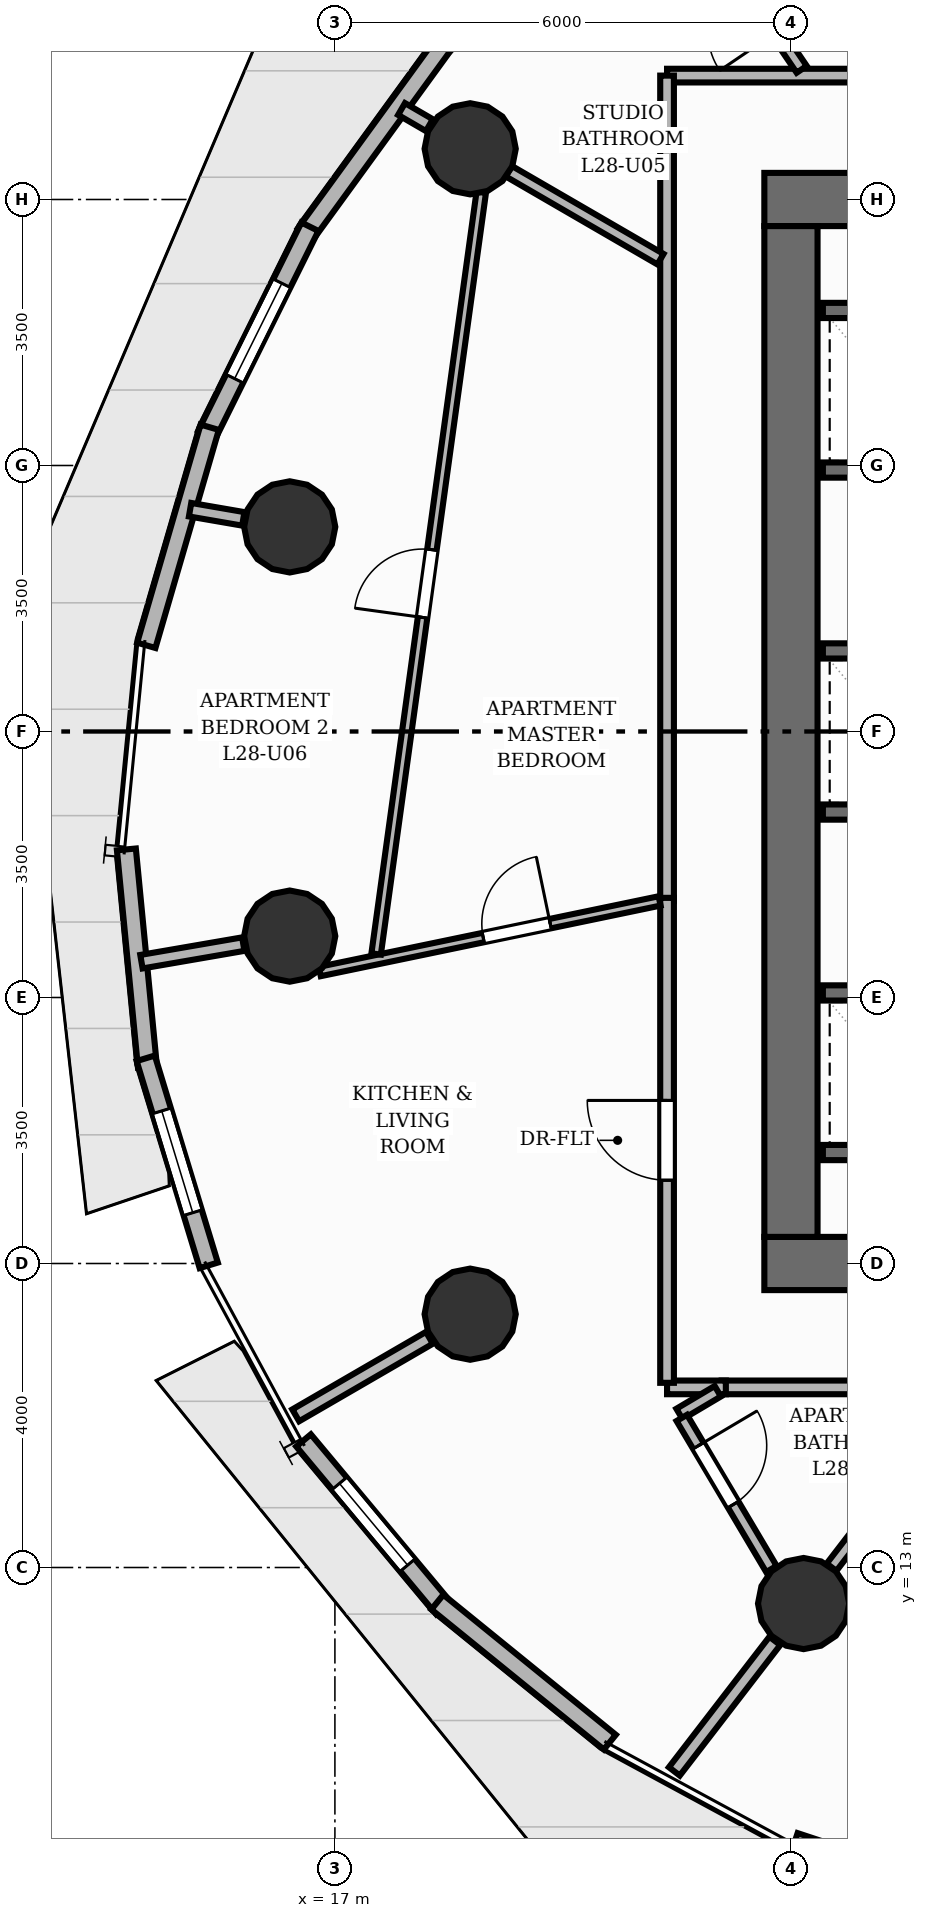
"""IFC4 building model, lengths in metres.
Left out: names, types, materials, properties, quantities, classifications, styles, units other than length and angle.
Written with IfcOpenShell. Run it as: python <this file> out.ifc"""

import sys

from ifc_helpers import new_model, si_unit, direction, frame, frame_2d, origin, origin_2d, place, context, subcontext, project, spatial, rectangle, circle, extrude, element, fill, save


model = new_model("IFC4")
c1 = context("Model", 3, precision=1e-05, world=origin(), true_north=direction((0.0, 1.0)))
c2 = subcontext(c1, "Body", "Model", "MODEL_VIEW")
j1 = project(units=[si_unit("LENGTHUNIT", "METRE"), si_unit("PLANEANGLEUNIT", "RADIAN")], contexts=[c1])
p1 = place(None, origin())
s1 = spatial("IfcSite", under=j1, at=p1, CompositionType="ELEMENT")
p2 = place(p1, origin())
s2 = spatial("IfcBuilding", under=s1, at=p2, CompositionType="ELEMENT")
p3 = place(p2, frame((0.0, 0.0, 96.48)))
s3 = spatial("IfcBuildingStorey", under=s2, at=p3, CompositionType="ELEMENT", Elevation=96.48)
p4 = place(p3, frame((22.65, 17.0, 0.0), z_axis=(0.0, 0.0, 1.0), x_axis=(1.0, 0.0, 0.0)))
e1 = element("IfcWall", 1, at=p4, inside=s3, PredefinedType="SHEAR", context=c2, shape_type="SweptSolid", body=[
    extrude(rectangle(XDim=18.7, YDim=0.7, at=frame_2d((9.35, 0.0))), origin(), (0.0, 0.0, 1.0), 3.2),
])
p5 = place(p4, frame((5.85, 0.0, 0.0)))
e2 = element("IfcOpeningElement", 2, at=p5, cuts=e1, PredefinedType="OPENING", context=c2, shape_type="SweptSolid", body=[
    extrude(rectangle(XDim=1.1, YDim=2.15, at=frame_2d((0.55, 1.075))), frame((0.0, 0.36, 0.0), z_axis=(0.0, -1.0, 0.0), x_axis=(1.0, 0.0, 0.0)), (0.0, 0.0, 1.0), 0.72),
])
p6 = place(p4, frame((9.4, 0.0, 0.0)))
e3 = element("IfcOpeningElement", 3, at=p6, cuts=e1, PredefinedType="OPENING", context=c2, shape_type="SweptSolid", body=[
    extrude(rectangle(XDim=0.9, YDim=2.1, at=frame_2d((0.45, 1.05))), frame((0.0, 0.36, 0.0), z_axis=(0.0, -1.0, 0.0), x_axis=(1.0, 0.0, 0.0)), (0.0, 0.0, 1.0), 0.72),
])
p7 = place(p3, frame((22.65, 31.0, 0.0), z_axis=(0.0, 0.0, 1.0), x_axis=(1.0, 0.0, 0.0)))
e4 = element("IfcWall", 4, at=p7, inside=s3, PredefinedType="SHEAR", context=c2, shape_type="SweptSolid", body=[
    extrude(rectangle(XDim=18.7, YDim=0.7, at=frame_2d((9.35, 0.0))), origin(), (0.0, 0.0, 1.0), 3.2),
])
p8 = place(p7, frame((11.75, 0.0, 0.0)))
e5 = element("IfcOpeningElement", 5, at=p8, cuts=e4, PredefinedType="OPENING", context=c2, shape_type="SweptSolid", body=[
    extrude(rectangle(XDim=1.1, YDim=2.15, at=frame_2d((0.55, 1.075))), frame((0.0, 0.36, 0.0), z_axis=(0.0, -1.0, 0.0), x_axis=(1.0, 0.0, 0.0)), (0.0, 0.0, 1.0), 0.72),
])
p9 = place(p3, frame((23.0, 17.35, 0.0), z_axis=(0.0, 0.0, 1.0), x_axis=(0.0, 1.0, 0.0)))
e6 = element("IfcWall", 6, at=p9, inside=s3, PredefinedType="SHEAR", context=c2, shape_type="SweptSolid", body=[
    extrude(rectangle(XDim=13.3, YDim=0.7, at=frame_2d((6.65, 0.0))), origin(), (0.0, 0.0, 1.0), 3.2),
])
for number, where, z_axis, x_axis in (
    (7, (18.78, 31.667, 0.0), (0.0, 0.0, 1.0), (1.0, 0.0, 0.0)),
    (8, (16.406, 26.692, 0.0), (0.0, 0.0, 1.0), (1.0, 0.0, 0.0)),
    (9, (16.406, 21.308, 0.0), (0.0, 0.0, 1.0), (1.0, 0.0, 0.0)),
    (10, (18.78, 16.333, 0.0), (0.0, 0.0, 1.0), (1.0, 0.0, 0.0)),
    (11, (23.167, 12.526, 0.0), (0.0, 0.0, 1.0), (1.0, 0.0, 0.0)),
):
    element("IfcColumn", number, at=place(p3, frame(where, z_axis=z_axis, x_axis=x_axis)), inside=s3, PredefinedType="COLUMN", context=c2, shape_type="SweptSolid", body=[
        extrude(circle(Radius=0.6, at=origin_2d()), origin(), (0.0, 0.0, 1.0), 3.2),
    ])
p10 = place(p3, frame((18.384, 32.996, 0.0), z_axis=(0.0, 0.0, 1.0), x_axis=(0.710540573889, 0.703656232017, 0.0)))
e12 = element("IfcWall", 12, at=p10, inside=s3, PredefinedType="SOLIDWALL", context=c2, shape_type="SweptSolid", body=[
    extrude(rectangle(XDim=3.192, YDim=0.25, at=frame_2d((1.596, 0.0))), origin(), (0.0, 0.0, 1.0), 2.96),
])
p11 = place(p10, frame((0.771, 0.0, 0.85)))
e13 = element("IfcOpeningElement", 13, at=p11, cuts=e12, PredefinedType="OPENING", context=c2, shape_type="SweptSolid", body=[
    extrude(rectangle(XDim=1.65, YDim=1.55, at=frame_2d((0.825, 0.775))), frame((0.0, 0.135, 0.0), z_axis=(0.0, -1.0, 0.0), x_axis=(1.0, 0.0, 0.0)), (0.0, 0.0, 1.0), 0.27),
])
p12 = place(p3, frame((16.614, 30.547, 0.0), z_axis=(0.0, 0.0, 1.0), x_axis=(0.588208785685, 0.808709109905, 0.0)))
e14 = element("IfcWall", 14, at=p12, inside=s3, PredefinedType="SOLIDWALL", context=c2, shape_type="SweptSolid", body=[
    extrude(rectangle(XDim=3.131, YDim=0.25, at=frame_2d((1.565, 0.0))), origin(), (0.0, 0.0, 1.0), 2.96),
])
p13 = place(p3, frame((15.312, 27.899, 0.0), z_axis=(0.0, 0.0, 1.0), x_axis=(0.443988069997, 0.896032696781, 0.0)))
e15 = element("IfcWall", 15, at=p13, inside=s3, PredefinedType="SOLIDWALL", context=c2, shape_type="SweptSolid", body=[
    extrude(rectangle(XDim=3.061, YDim=0.25, at=frame_2d((1.53, 0.0))), origin(), (0.0, 0.0, 1.0), 2.96),
])
p14 = place(p13, frame((0.83, 0.0, 0.85)))
e16 = element("IfcOpeningElement", 16, at=p14, cuts=e15, PredefinedType="OPENING", context=c2, shape_type="SweptSolid", body=[
    extrude(rectangle(XDim=1.4, YDim=1.55, at=frame_2d((0.7, 0.775))), frame((0.0, 0.135, 0.0), z_axis=(0.0, -1.0, 0.0), x_axis=(1.0, 0.0, 0.0)), (0.0, 0.0, 1.0), 0.27),
])
p15 = place(p3, frame((14.519, 25.134, 0.0), z_axis=(0.0, 0.0, 1.0), x_axis=(0.279152874041, 0.960246672952, 0.0)))
e17 = element("IfcWall", 17, at=p15, inside=s3, PredefinedType="SOLIDWALL", context=c2, shape_type="SweptSolid", body=[
    extrude(rectangle(XDim=2.989, YDim=0.25, at=frame_2d((1.494, 0.0))), origin(), (0.0, 0.0, 1.0), 2.96),
])
p16 = place(p3, frame((14.533, 19.588, 0.0), z_axis=(0.0, 0.0, 1.0), x_axis=(-0.096332339466, 0.995349225334, 0.0)))
e18 = element("IfcWall", 18, at=p16, inside=s3, PredefinedType="SOLIDWALL", context=c2, shape_type="SweptSolid", body=[
    extrude(rectangle(XDim=2.874, YDim=0.25, at=frame_2d((1.437, 0.0))), origin(), (0.0, 0.0, 1.0), 2.96),
])
p17 = place(p3, frame((15.34, 16.976, 0.0), z_axis=(0.0, 0.0, 1.0), x_axis=(-0.291144558409, 0.956679071637, 0.0)))
e19 = element("IfcWall", 19, at=p17, inside=s3, PredefinedType="SOLIDWALL", context=c2, shape_type="SweptSolid", body=[
    extrude(rectangle(XDim=2.848, YDim=0.25, at=frame_2d((1.424, 0.0))), origin(), (0.0, 0.0, 1.0), 2.96),
])
p18 = place(p17, frame((0.724, 0.0, 0.85)))
e20 = element("IfcOpeningElement", 20, at=p18, cuts=e19, PredefinedType="OPENING", context=c2, shape_type="SweptSolid", body=[
    extrude(rectangle(XDim=1.4, YDim=1.55, at=frame_2d((0.7, 0.775))), frame((0.0, 0.135, 0.0), z_axis=(0.0, -1.0, 0.0), x_axis=(1.0, 0.0, 0.0)), (0.0, 0.0, 1.0), 0.27),
])
p19 = place(p3, frame((18.428, 12.465, 0.0), z_axis=(0.0, 0.0, 1.0), x_axis=(-0.640518566271, 0.76794268423, 0.0)))
e21 = element("IfcWall", 21, at=p19, inside=s3, PredefinedType="SOLIDWALL", context=c2, shape_type="SweptSolid", body=[
    extrude(rectangle(XDim=2.874, YDim=0.25, at=frame_2d((1.437, 0.0))), origin(), (0.0, 0.0, 1.0), 2.96),
])
p20 = place(p19, frame((0.737, 0.0, 0.85)))
e22 = element("IfcOpeningElement", 22, at=p20, cuts=e21, PredefinedType="OPENING", context=c2, shape_type="SweptSolid", body=[
    extrude(rectangle(XDim=1.4, YDim=1.55, at=frame_2d((0.7, 0.775))), frame((0.0, 0.135, 0.0), z_axis=(0.0, -1.0, 0.0), x_axis=(1.0, 0.0, 0.0)), (0.0, 0.0, 1.0), 0.27),
])
p21 = place(p3, frame((20.617, 10.702, 0.0), z_axis=(0.0, 0.0, 1.0), x_axis=(-0.776285131062, 0.630381943976, 0.0)))
e23 = element("IfcWall", 23, at=p21, inside=s3, PredefinedType="SOLIDWALL", context=c2, shape_type="SweptSolid", body=[
    extrude(rectangle(XDim=2.923, YDim=0.25, at=frame_2d((1.462, 0.0))), origin(), (0.0, 0.0, 1.0), 2.96),
])
p22 = place(p3, frame((25.955, 8.426, 0.0), z_axis=(0.0, 0.0, 1.0), x_axis=(-0.949533409058, 0.313665913166, 0.0)))
e24 = element("IfcWall", 24, at=p22, inside=s3, PredefinedType="SOLIDWALL", context=c2, shape_type="SweptSolid", body=[
    extrude(rectangle(XDim=3.061, YDim=0.25, at=frame_2d((1.53, 0.0))), origin(), (0.0, 0.0, 1.0), 2.96),
])
for number, where, z_axis, x_axis in (
    (25, (23.42, 18.46, 0.0), (0.0, 0.0, 1.0), (1.0, 0.0, 0.0)),
    (26, (23.42, 29.54, 0.0), (0.0, 0.0, 1.0), (1.0, 0.0, 0.0)),
    (27, (23.42, 20.56, 0.0), (0.0, 0.0, 1.0), (1.0, 0.0, 0.0)),
    (28, (23.42, 22.94, 0.0), (0.0, 0.0, 1.0), (1.0, 0.0, 0.0)),
    (29, (23.42, 25.06, 0.0), (0.0, 0.0, 1.0), (1.0, 0.0, 0.0)),
    (30, (23.42, 27.44, 0.0), (0.0, 0.0, 1.0), (1.0, 0.0, 0.0)),
):
    element("IfcWall", number, at=place(p3, frame(where, z_axis=z_axis, x_axis=x_axis)), inside=s3, PredefinedType="SHEAR", context=c2, shape_type="SweptSolid", body=[
        extrude(rectangle(XDim=1.71, YDim=0.2, at=frame_2d((0.855, 0.0))), origin(), (0.0, 0.0, 1.0), 3.2),
    ])
p23 = place(p3, frame((18.243, 31.978, 0.0), z_axis=(0.0, 0.0, 1.0), x_axis=(-0.864926134071, 0.501899175733, 0.0)))
e31 = element("IfcWall", 31, at=p23, inside=s3, PredefinedType="PARTITIONING", context=c2, shape_type="SweptSolid", body=[
    extrude(rectangle(XDim=0.424, YDim=0.18, at=frame_2d((0.212, 0.0))), origin(), (0.0, 0.0, 1.0), 2.26),
])
p24 = place(p3, frame((15.794, 26.798, 0.0), z_axis=(0.0, 0.0, 1.0), x_axis=(-0.985420399327, 0.17013711115, 0.0)))
e32 = element("IfcWall", 32, at=p24, inside=s3, PredefinedType="PARTITIONING", context=c2, shape_type="SweptSolid", body=[
    extrude(rectangle(XDim=0.71, YDim=0.18, at=frame_2d((0.355, 0.0))), origin(), (0.0, 0.0, 1.0), 2.26),
])
p25 = place(p3, frame((15.794, 21.202, 0.0), z_axis=(0.0, 0.0, 1.0), x_axis=(-0.98540615772, -0.170219576807, 0.0)))
e33 = element("IfcWall", 33, at=p25, inside=s3, PredefinedType="PARTITIONING", context=c2, shape_type="SweptSolid", body=[
    extrude(rectangle(XDim=1.36, YDim=0.18, at=frame_2d((0.68, 0.0))), origin(), (0.0, 0.0, 1.0), 2.26),
])
p26 = place(p3, frame((18.243, 16.022, 0.0), z_axis=(0.0, 0.0, 1.0), x_axis=(-0.865025978628, -0.501727073516, 0.0)))
e34 = element("IfcWall", 34, at=p26, inside=s3, PredefinedType="PARTITIONING", context=c2, shape_type="SweptSolid", body=[
    extrude(rectangle(XDim=2.033, YDim=0.18, at=frame_2d((1.017, 0.0))), origin(), (0.0, 0.0, 1.0), 2.26),
])
p27 = place(p3, frame((22.788, 12.034, 0.0), z_axis=(0.0, 0.0, 1.0), x_axis=(-0.610026423006, -0.792381071981, 0.0)))
e35 = element("IfcWall", 35, at=p27, inside=s3, PredefinedType="PARTITIONING", context=c2, shape_type="SweptSolid", body=[
    extrude(rectangle(XDim=2.167, YDim=0.18, at=frame_2d((1.084, 0.0))), origin(), (0.0, 0.0, 1.0), 2.26),
])
p28 = place(p3, frame((38.645, 15.37, 0.0), z_axis=(0.0, 0.0, 1.0), x_axis=(-1.0, 0.0, 0.0)))
e36 = element("IfcWall", 36, at=p28, inside=s3, PredefinedType="PARTITIONING", context=c2, shape_type="SweptSolid", body=[
    extrude(rectangle(XDim=16.557, YDim=0.18, at=frame_2d((8.278, 0.0))), origin(), (0.0, 0.0, 1.0), 2.955),
])
p29 = place(p28, frame((6.513, 0.0, 0.0)))
e37 = element("IfcOpeningElement", 37, at=p29, cuts=e36, PredefinedType="OPENING", context=c2, shape_type="SweptSolid", body=[
    extrude(rectangle(XDim=1.05, YDim=2.15, at=frame_2d((0.525, 1.075))), frame((0.0, 0.1, 0.0), z_axis=(0.0, -1.0, 0.0), x_axis=(1.0, 0.0, 0.0)), (0.0, 0.0, 1.0), 0.2),
])
p30 = place(p3, frame((21.37, 32.63, 0.0), z_axis=(0.0, 0.0, 1.0), x_axis=(1.0, 0.0, 0.0)))
e38 = element("IfcWall", 38, at=p30, inside=s3, PredefinedType="PARTITIONING", context=c2, shape_type="SweptSolid", body=[
    extrude(rectangle(XDim=12.686, YDim=0.18, at=frame_2d((6.343, 0.0))), origin(), (0.0, 0.0, 1.0), 2.955),
])
p31 = place(p30, frame((10.499, 0.0, 0.0)))
e39 = element("IfcOpeningElement", 39, at=p31, cuts=e38, PredefinedType="OPENING", context=c2, shape_type="SweptSolid", body=[
    extrude(rectangle(XDim=1.05, YDim=2.15, at=frame_2d((0.525, 1.075))), frame((0.0, 0.1, 0.0), z_axis=(0.0, -1.0, 0.0), x_axis=(1.0, 0.0, 0.0)), (0.0, 0.0, 1.0), 0.2),
])
p32 = place(p30, frame((4.713, 0.0, 0.0)))
e40 = element("IfcOpeningElement", 40, at=p32, cuts=e38, PredefinedType="OPENING", context=c2, shape_type="SweptSolid", body=[
    extrude(rectangle(XDim=1.05, YDim=2.15, at=frame_2d((0.525, 1.075))), frame((0.0, 0.1, 0.0), z_axis=(0.0, -1.0, 0.0), x_axis=(1.0, 0.0, 0.0)), (0.0, 0.0, 1.0), 0.2),
])
p33 = place(p3, frame((21.37, 21.771, 0.0), z_axis=(0.0, 0.0, 1.0), x_axis=(0.0, 1.0, 0.0)))
e41 = element("IfcWall", 41, at=p33, inside=s3, PredefinedType="PARTITIONING", context=c2, shape_type="SweptSolid", body=[
    extrude(rectangle(XDim=10.859, YDim=0.18, at=frame_2d((5.43, 0.0))), origin(), (0.0, 0.0, 1.0), 2.955),
])
p34 = place(p3, frame((22.144, 15.37, 0.0), z_axis=(0.0, 0.0, 1.0), x_axis=(-1.0, 0.0, 0.0)))
e42 = element("IfcWall", 42, at=p34, inside=s3, PredefinedType="PARTITIONING", context=c2, shape_type="SweptSolid", body=[
    extrude(rectangle(XDim=0.773, YDim=0.18, at=frame_2d((0.387, 0.0))), origin(), (0.0, 0.0, 1.0), 2.955),
])
p35 = place(p3, frame((21.37, 15.43, 0.0), z_axis=(0.0, 0.0, 1.0), x_axis=(0.0, 1.0, 0.0)))
e43 = element("IfcWall", 43, at=p35, inside=s3, PredefinedType="PARTITIONING", context=c2, shape_type="SweptSolid", body=[
    extrude(rectangle(XDim=6.381, YDim=0.18, at=frame_2d((3.19, 0.0))), origin(), (0.0, 0.0, 1.0), 2.955),
])
p36 = place(p35, frame((2.666, 0.0, 0.0)))
e44 = element("IfcOpeningElement", 44, at=p36, cuts=e43, PredefinedType="OPENING", context=c2, shape_type="SweptSolid", body=[
    extrude(rectangle(XDim=1.05, YDim=2.15, at=frame_2d((0.525, 1.075))), frame((0.0, 0.1, 0.0), z_axis=(0.0, -1.0, 0.0), x_axis=(1.0, 0.0, 0.0)), (0.0, 0.0, 1.0), 0.2),
])
p37 = place(p3, frame((23.534, 13.003, 0.0), z_axis=(0.0, 0.0, 1.0), x_axis=(0.610033601295, 0.792375545617, 0.0)))
e45 = element("IfcWall", 45, at=p37, inside=s3, PredefinedType="PLUMBINGWALL", context=c2, shape_type="SweptSolid", body=[
    extrude(rectangle(XDim=2.887, YDim=0.16, at=frame_2d((1.443, 0.0))), origin(), (0.0, 0.0, 1.0), 2.26),
])
p38 = place(p3, frame((23.142, 32.713, 0.0), z_axis=(0.0, 0.0, 1.0), x_axis=(-0.561921019334, 0.827190889717, 0.0)))
e46 = element("IfcWall", 46, at=p38, inside=s3, PredefinedType="PLUMBINGWALL", context=c2, shape_type="SweptSolid", body=[
    extrude(rectangle(XDim=3.485, YDim=0.16, at=frame_2d((1.743, 0.0))), origin(), (0.0, 0.0, 1.0), 2.641),
])
p39 = place(p38, frame((0.593, 0.0, 0.0)))
e47 = element("IfcOpeningElement", 47, at=p39, cuts=e46, PredefinedType="OPENING", context=c2, shape_type="SweptSolid", body=[
    extrude(rectangle(XDim=0.9, YDim=2.1, at=frame_2d((0.45, 1.05))), frame((0.0, 0.09, 0.0), z_axis=(0.0, -1.0, 0.0), x_axis=(1.0, 0.0, 0.0)), (0.0, 0.0, 1.0), 0.18),
])
p40 = place(p3, frame((21.283, 30.215, 0.0), z_axis=(0.0, 0.0, 1.0), x_axis=(-0.865054150745, 0.501678498921, 0.0)))
e48 = element("IfcWall", 48, at=p40, inside=s3, PredefinedType="PLUMBINGWALL", context=c2, shape_type="SweptSolid", body=[
    extrude(rectangle(XDim=2.307, YDim=0.16, at=frame_2d((1.154, 0.0))), origin(), (0.0, 0.0, 1.0), 2.26),
])
p41 = place(p3, frame((22.038, 15.319, 0.0), z_axis=(0.0, 0.0, 1.0), x_axis=(-0.860054653874, -0.510201913315, 0.0)))
e49 = element("IfcWall", 49, at=p41, inside=s3, PredefinedType="PLUMBINGWALL", context=c2, shape_type="SweptSolid", body=[
    extrude(rectangle(XDim=0.586, YDim=0.16, at=frame_2d((0.293, 0.0))), origin(), (0.0, 0.0, 1.0), 2.955),
])
p42 = place(p3, frame((21.564, 14.969, 0.0), z_axis=(0.0, 0.0, 1.0), x_axis=(0.51007742589, -0.860128490168, 0.0)))
e50 = element("IfcWall", 50, at=p42, inside=s3, PredefinedType="PLUMBINGWALL", context=c2, shape_type="SweptSolid", body=[
    extrude(rectangle(XDim=2.311, YDim=0.16, at=frame_2d((1.156, 0.0))), origin(), (0.0, 0.0, 1.0), 2.403),
])
p43 = place(p42, frame((0.426, 0.0, 0.0)))
e51 = element("IfcOpeningElement", 51, at=p43, cuts=e50, PredefinedType="OPENING", context=c2, shape_type="SweptSolid", body=[
    extrude(rectangle(XDim=0.9, YDim=2.1, at=frame_2d((0.45, 1.05))), frame((0.0, 0.09, 0.0), z_axis=(0.0, -1.0, 0.0), x_axis=(1.0, 0.0, 0.0)), (0.0, 0.0, 1.0), 0.18),
])
p44 = place(p3, frame((16.801, 20.842, 0.0), z_axis=(0.0, 0.0, 1.0), x_axis=(0.979089254375, 0.203431147977, 0.0)))
e52 = element("IfcWall", 52, at=p44, inside=s3, PredefinedType="PARTITIONING", context=c2, shape_type="SweptSolid", body=[
    extrude(rectangle(XDim=4.566, YDim=0.125, at=frame_2d((2.283, 0.0))), origin(), (0.0, 0.0, 1.0), 2.955),
])
p45 = place(p44, frame((2.196, 0.0, 0.0)))
e53 = element("IfcOpeningElement", 53, at=p45, cuts=e52, PredefinedType="OPENING", context=c2, shape_type="SweptSolid", body=[
    extrude(rectangle(XDim=0.9, YDim=2.1, at=frame_2d((0.45, 1.05))), frame((0.0, 0.073, 0.0), z_axis=(0.0, -1.0, 0.0), x_axis=(1.0, 0.0, 0.0)), (0.0, 0.0, 1.0), 0.145),
])
p46 = place(p3, frame((17.542, 21.073, 0.0), z_axis=(0.0, 0.0, 1.0), x_axis=(0.136714950607, 0.99061042912, 0.0)))
e54 = element("IfcWall", 54, at=p46, inside=s3, PredefinedType="PARTITIONING", context=c2, shape_type="SweptSolid", body=[
    extrude(rectangle(XDim=10.12, YDim=0.125, at=frame_2d((5.06, 0.0))), origin(), (0.0, 0.0, 1.0), 2.955),
])
p47 = place(p46, frame((4.47, 0.0, 0.0)))
e55 = element("IfcOpeningElement", 55, at=p47, cuts=e54, PredefinedType="OPENING", context=c2, shape_type="SweptSolid", body=[
    extrude(rectangle(XDim=0.9, YDim=2.1, at=frame_2d((0.45, 1.05))), frame((0.0, 0.073, 0.0), z_axis=(0.0, -1.0, 0.0), x_axis=(1.0, 0.0, 0.0)), (0.0, 0.0, 1.0), 0.145),
])
p48 = place(p14, origin())
e56 = element("IfcWindow", 56, at=p48, inside=s3, PartitioningType="SINGLE_PANEL", PredefinedType="WINDOW", context=c2, shape_type="SweptSolid", body=[
    extrude(rectangle(XDim=1.4, YDim=1.55, at=frame_2d((0.7, 0.775))), frame((0.0, 0.03, 0.0), z_axis=(0.0, -1.0, 0.0), x_axis=(1.0, 0.0, 0.0)), (0.0, 0.0, 1.0), 0.06),
])
fill(e16, e56)
p49 = place(p18, origin())
e57 = element("IfcWindow", 57, at=p49, inside=s3, PartitioningType="SINGLE_PANEL", PredefinedType="WINDOW", context=c2, shape_type="SweptSolid", body=[
    extrude(rectangle(XDim=1.4, YDim=1.55, at=frame_2d((0.7, 0.775))), frame((0.0, 0.03, 0.0), z_axis=(0.0, -1.0, 0.0), x_axis=(1.0, 0.0, 0.0)), (0.0, 0.0, 1.0), 0.06),
])
fill(e20, e57)
p50 = place(p20, origin())
e58 = element("IfcWindow", 58, at=p50, inside=s3, PartitioningType="SINGLE_PANEL", PredefinedType="WINDOW", context=c2, shape_type="SweptSolid", body=[
    extrude(rectangle(XDim=1.4, YDim=1.55, at=frame_2d((0.7, 0.775))), frame((0.0, 0.03, 0.0), z_axis=(0.0, -1.0, 0.0), x_axis=(1.0, 0.0, 0.0)), (0.0, 0.0, 1.0), 0.06),
])
fill(e22, e58)
p51 = place(p36, origin())
e59 = element("IfcDoor", 59, at=p51, inside=s3, OperationType="SINGLE_SWING_RIGHT", PredefinedType="DOOR", context=c2, shape_type="SweptSolid", body=[
    extrude(rectangle(XDim=1.05, YDim=2.15, at=frame_2d((0.525, 1.075))), frame((0.0, 0.025, 0.0), z_axis=(0.0, -1.0, 0.0), x_axis=(1.0, 0.0, 0.0)), (0.0, 0.0, 1.0), 0.05),
])
fill(e44, e59)
p52 = place(p43, origin())
e60 = element("IfcDoor", 60, at=p52, inside=s3, OperationType="SINGLE_SWING_LEFT", PredefinedType="DOOR", context=c2, shape_type="SweptSolid", body=[
    extrude(rectangle(XDim=0.9, YDim=2.1, at=frame_2d((0.45, 1.05))), frame((0.0, 0.025, 0.0), z_axis=(0.0, -1.0, 0.0), x_axis=(1.0, 0.0, 0.0)), (0.0, 0.0, 1.0), 0.05),
])
fill(e51, e60)
p53 = place(p45, origin())
e61 = element("IfcDoor", 61, at=p53, inside=s3, OperationType="SINGLE_SWING_RIGHT", PredefinedType="DOOR", context=c2, shape_type="SweptSolid", body=[
    extrude(rectangle(XDim=0.9, YDim=2.1, at=frame_2d((0.45, 1.05))), frame((0.0, 0.025, 0.0), z_axis=(0.0, -1.0, 0.0), x_axis=(1.0, 0.0, 0.0)), (0.0, 0.0, 1.0), 0.05),
])
fill(e53, e61)
p54 = place(p47, origin())
e62 = element("IfcDoor", 62, at=p54, inside=s3, OperationType="SINGLE_SWING_LEFT", PredefinedType="DOOR", context=c2, shape_type="SweptSolid", body=[
    extrude(rectangle(XDim=0.9, YDim=2.1, at=frame_2d((0.45, 1.05))), frame((0.0, 0.025, 0.0), z_axis=(0.0, -1.0, 0.0), x_axis=(1.0, 0.0, 0.0)), (0.0, 0.0, 1.0), 0.05),
])
fill(e55, e62)
save(model, sys.argv[1])
